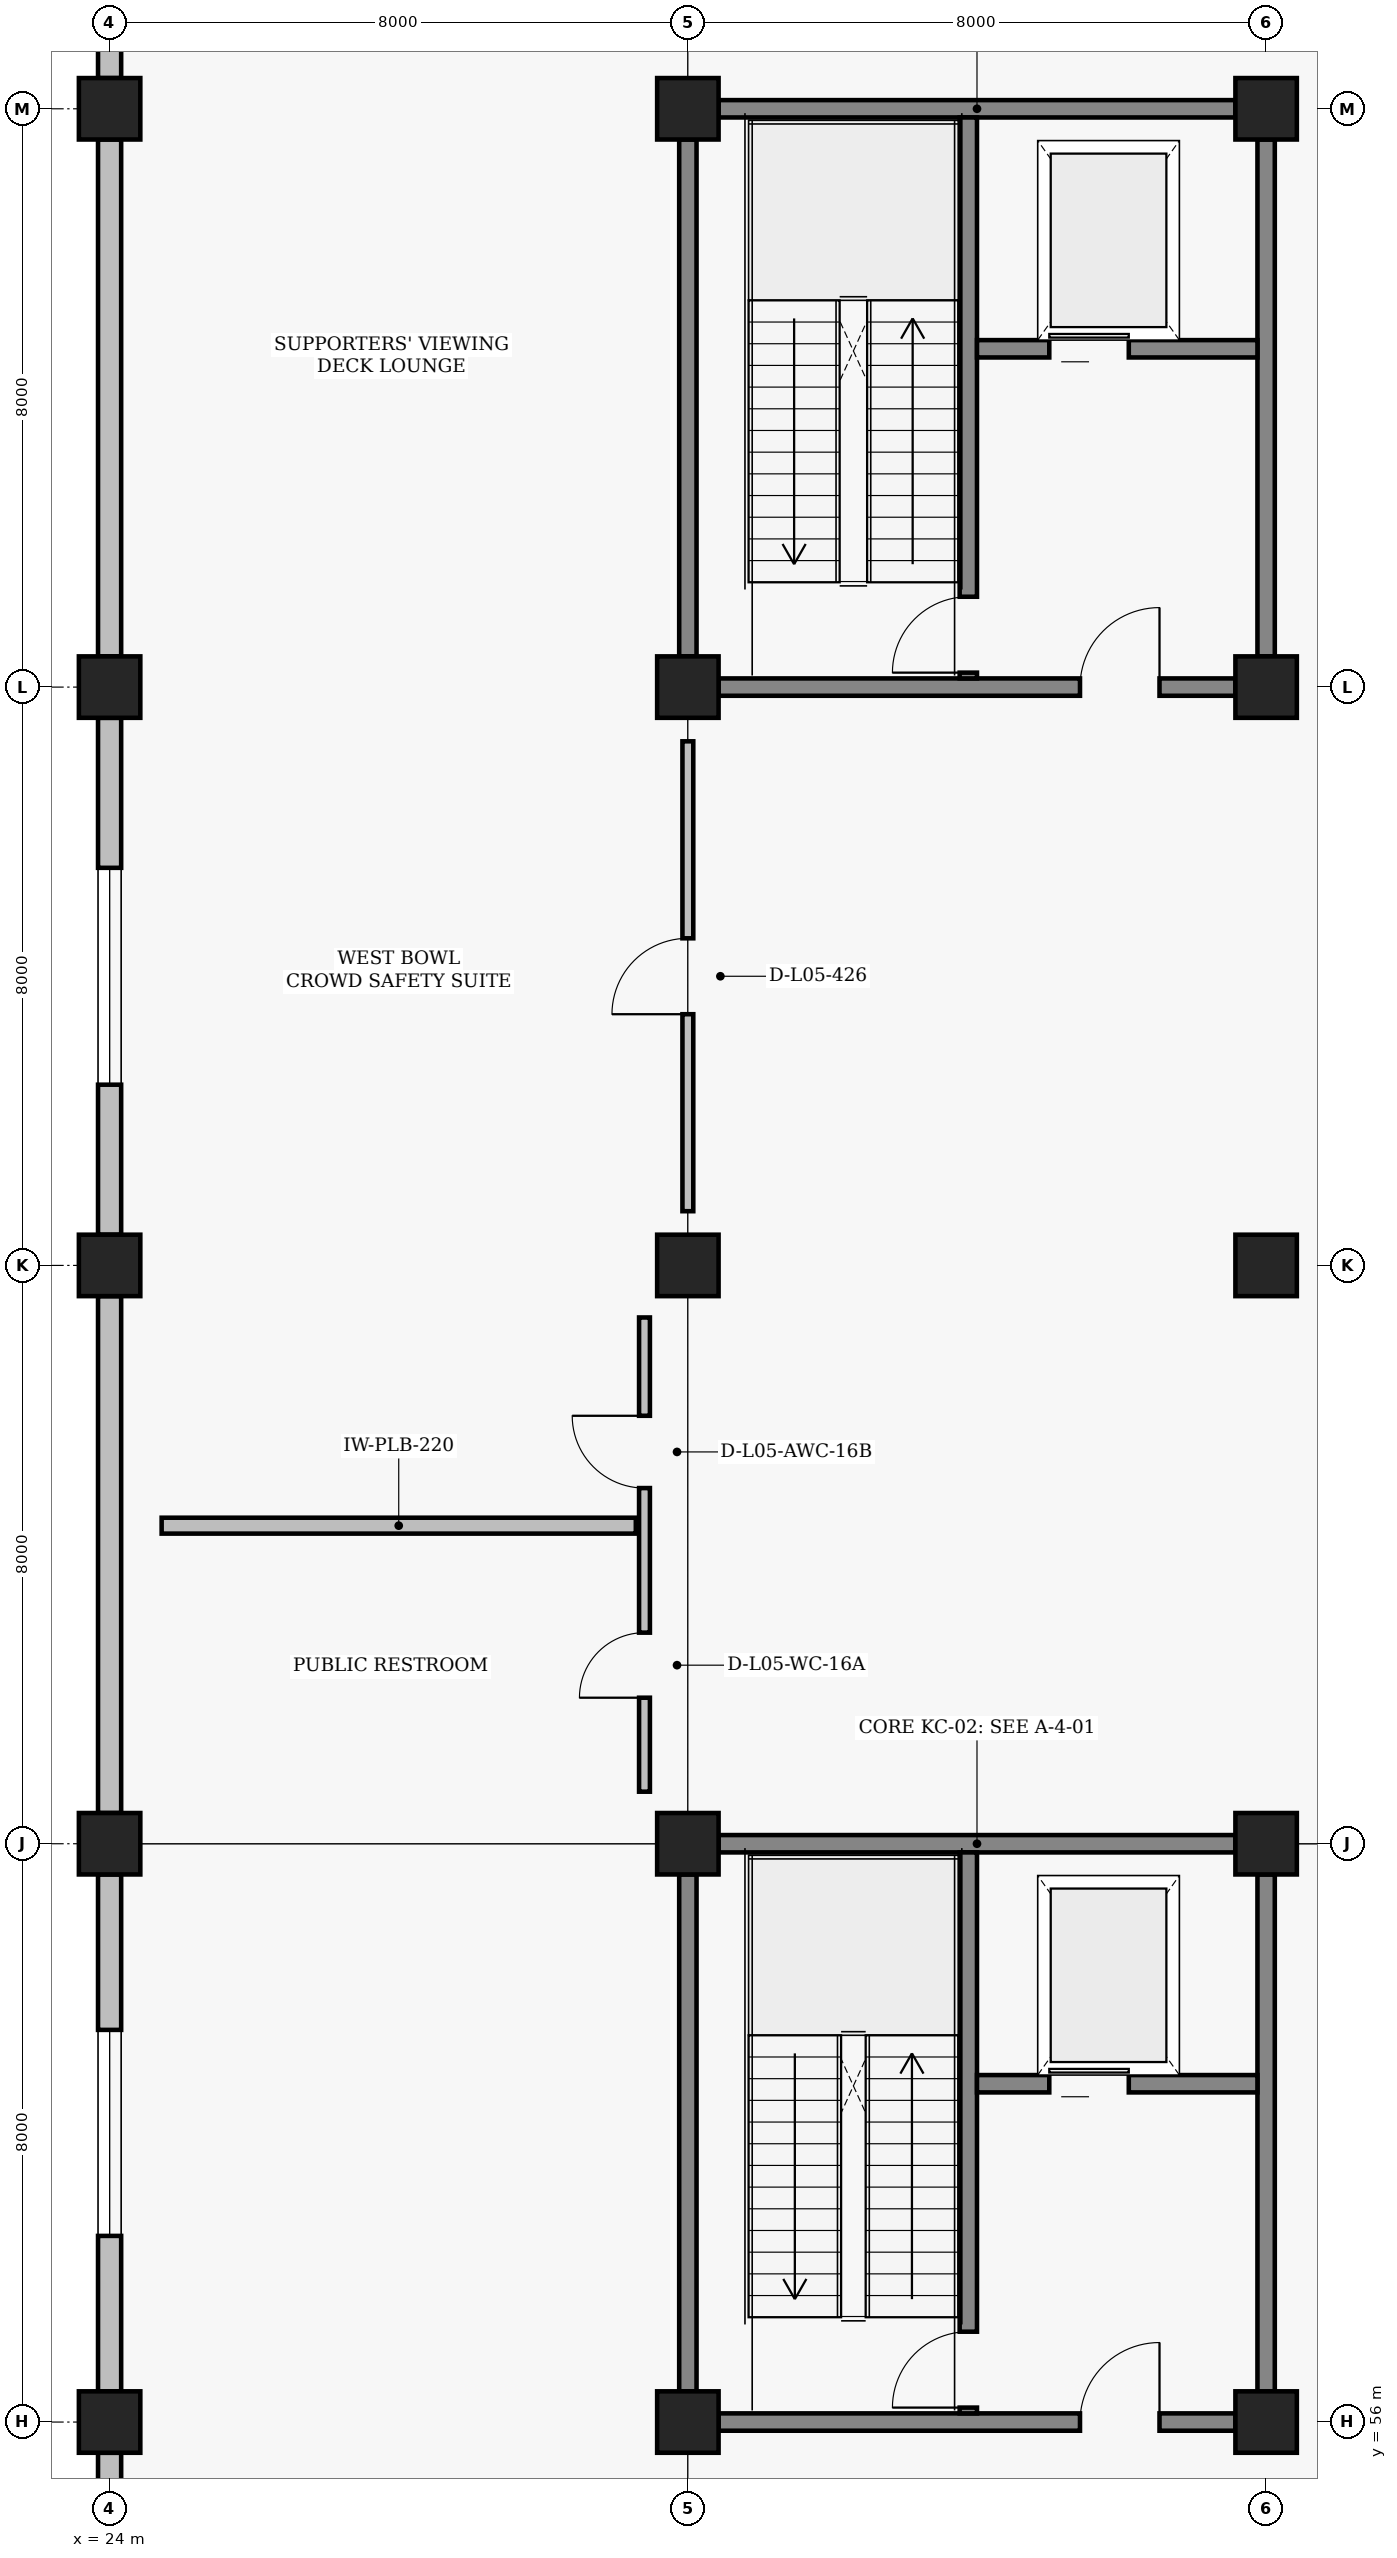
"""IFC4 building model, lengths in metres.
Left out: names, types, materials, properties, quantities, classifications, styles, units other than length and angle.
Written with IfcOpenShell. Run it as: python <this file> out.ifc"""

import sys

from ifc_helpers import new_model, si_unit, direction, frame, frame_2d, origin, origin_2d, place, context, subcontext, project, spatial, rectangle, extrude, element, fill, save


model = new_model("IFC4")
c1 = context("Model", 3, precision=1e-05, world=origin(), true_north=direction((0.0, 1.0)))
c2 = subcontext(c1, "Body", "Model", "MODEL_VIEW")
j1 = project(units=[si_unit("LENGTHUNIT", "METRE"), si_unit("PLANEANGLEUNIT", "RADIAN")], contexts=[c1])
p1 = place(None, origin())
s1 = spatial("IfcSite", under=j1, at=p1, CompositionType="ELEMENT")
p2 = place(p1, origin())
s2 = spatial("IfcBuilding", under=s1, at=p2, CompositionType="ELEMENT")
p3 = place(p2, frame((0.0, 0.0, 18.6)))
s3 = spatial("IfcBuildingStorey", under=s2, at=p3, CompositionType="ELEMENT", Elevation=18.6)
for number, where, z_axis, x_axis in (
    (1, (24.0, 56.0, 0.0), (0.0, 0.0, 1.0), (1.0, 0.0, 0.0)),
    (2, (24.0, 64.0, 0.0), (0.0, 0.0, 1.0), (1.0, 0.0, 0.0)),
    (3, (24.0, 72.0, 0.0), (0.0, 0.0, 1.0), (1.0, 0.0, 0.0)),
    (4, (24.0, 80.0, 0.0), (0.0, 0.0, 1.0), (1.0, 0.0, 0.0)),
    (5, (24.0, 88.0, 0.0), (0.0, 0.0, 1.0), (1.0, 0.0, 0.0)),
    (6, (32.0, 56.0, 0.0), (0.0, 0.0, 1.0), (1.0, 0.0, 0.0)),
    (7, (32.0, 64.0, 0.0), (0.0, 0.0, 1.0), (1.0, 0.0, 0.0)),
    (8, (32.0, 72.0, 0.0), (0.0, 0.0, 1.0), (1.0, 0.0, 0.0)),
    (9, (32.0, 80.0, 0.0), (0.0, 0.0, 1.0), (1.0, 0.0, 0.0)),
    (10, (32.0, 88.0, 0.0), (0.0, 0.0, 1.0), (1.0, 0.0, 0.0)),
    (11, (40.0, 56.0, 0.0), (0.0, 0.0, 1.0), (1.0, 0.0, 0.0)),
    (12, (40.0, 64.0, 0.0), (0.0, 0.0, 1.0), (1.0, 0.0, 0.0)),
    (13, (40.0, 72.0, 0.0), (0.0, 0.0, 1.0), (1.0, 0.0, 0.0)),
    (14, (40.0, 80.0, 0.0), (0.0, 0.0, 1.0), (1.0, 0.0, 0.0)),
    (15, (40.0, 88.0, 0.0), (0.0, 0.0, 1.0), (1.0, 0.0, 0.0)),
):
    element("IfcColumn", number, at=place(p3, frame(where, z_axis=z_axis, x_axis=x_axis)), inside=s3, PredefinedType="COLUMN", context=c2, shape_type="SweptSolid", body=[
        extrude(rectangle(XDim=0.85, YDim=0.85, at=origin_2d()), origin(), (0.0, 0.0, 1.0), 4.2),
    ])
p4 = place(p3, frame((24.0, 48.425, 0.0), z_axis=(0.0, 0.0, 1.0), x_axis=(0.0, 1.0, 0.0)))
e16 = element("IfcWall", 16, at=p4, inside=s3, PredefinedType="SOLIDWALL", context=c2, shape_type="SweptSolid", body=[
    extrude(rectangle(XDim=7.15, YDim=0.32, at=frame_2d((3.575, 0.0))), origin(), (0.0, 0.0, 1.0), 3.34),
])
p5 = place(p3, frame((24.0, 56.425, 0.0), z_axis=(0.0, 0.0, 1.0), x_axis=(0.0, 1.0, 0.0)))
e17 = element("IfcWall", 17, at=p5, inside=s3, PredefinedType="SOLIDWALL", context=c2, shape_type="SweptSolid", body=[
    extrude(rectangle(XDim=7.15, YDim=0.32, at=frame_2d((3.575, 0.0))), origin(), (0.0, 0.0, 1.0), 3.34),
])
p6 = place(p5, frame((2.15, 0.0, 0.95)))
e18 = element("IfcOpeningElement", 18, at=p6, cuts=e17, PredefinedType="OPENING", context=c2, shape_type="SweptSolid", body=[
    extrude(rectangle(XDim=2.85, YDim=2.1, at=frame_2d((1.425, 1.05))), frame((0.0, 0.17, 0.0), z_axis=(0.0, -1.0, 0.0), x_axis=(1.0, 0.0, 0.0)), (0.0, 0.0, 1.0), 0.34),
])
p7 = place(p3, frame((24.0, 64.425, 0.0), z_axis=(0.0, 0.0, 1.0), x_axis=(0.0, 1.0, 0.0)))
e19 = element("IfcWall", 19, at=p7, inside=s3, PredefinedType="SOLIDWALL", context=c2, shape_type="SweptSolid", body=[
    extrude(rectangle(XDim=7.15, YDim=0.32, at=frame_2d((3.575, 0.0))), origin(), (0.0, 0.0, 1.0), 3.34),
])
p8 = place(p3, frame((24.0, 72.425, 0.0), z_axis=(0.0, 0.0, 1.0), x_axis=(0.0, 1.0, 0.0)))
e20 = element("IfcWall", 20, at=p8, inside=s3, PredefinedType="SOLIDWALL", context=c2, shape_type="SweptSolid", body=[
    extrude(rectangle(XDim=7.15, YDim=0.32, at=frame_2d((3.575, 0.0))), origin(), (0.0, 0.0, 1.0), 3.34),
])
p9 = place(p8, frame((2.075, 0.0, 0.95)))
e21 = element("IfcOpeningElement", 21, at=p9, cuts=e20, PredefinedType="OPENING", context=c2, shape_type="SweptSolid", body=[
    extrude(rectangle(XDim=3.0, YDim=2.1, at=frame_2d((1.5, 1.05))), frame((0.0, 0.17, 0.0), z_axis=(0.0, -1.0, 0.0), x_axis=(1.0, 0.0, 0.0)), (0.0, 0.0, 1.0), 0.34),
])
for number, where, z_axis, x_axis in (
    (22, (24.0, 80.425, 0.0), (0.0, 0.0, 1.0), (0.0, 1.0, 0.0)),
    (23, (24.0, 88.425, 0.0), (0.0, 0.0, 1.0), (0.0, 1.0, 0.0)),
):
    element("IfcWall", number, at=place(p3, frame(where, z_axis=z_axis, x_axis=x_axis)), inside=s3, PredefinedType="SOLIDWALL", context=c2, shape_type="SweptSolid", body=[
        extrude(rectangle(XDim=7.15, YDim=0.32, at=frame_2d((3.575, 0.0))), origin(), (0.0, 0.0, 1.0), 3.34),
    ])
p10 = place(p3, frame((32.425, 56.0, 0.0), z_axis=(0.0, 0.0, 1.0), x_axis=(1.0, 0.0, 0.0)))
e24 = element("IfcWall", 24, at=p10, inside=s3, PredefinedType="SHEAR", context=c2, shape_type="SweptSolid", body=[
    extrude(rectangle(XDim=7.15, YDim=0.24, at=frame_2d((3.575, 0.0))), origin(), (0.0, 0.0, 1.0), 3.34),
])
p11 = place(p10, frame((5.0, 0.0, 0.0)))
e25 = element("IfcOpeningElement", 25, at=p11, cuts=e24, PredefinedType="OPENING", context=c2, shape_type="SweptSolid", body=[
    extrude(rectangle(XDim=1.1, YDim=2.2, at=frame_2d((0.55, 1.1))), frame((0.0, 0.13, 0.0), z_axis=(0.0, -1.0, 0.0), x_axis=(1.0, 0.0, 0.0)), (0.0, 0.0, 1.0), 0.26),
])
for number, where, z_axis, x_axis in (
    (26, (32.425, 64.0, 0.0), (0.0, 0.0, 1.0), (1.0, 0.0, 0.0)),
    (27, (32.0, 56.425, 0.0), (0.0, 0.0, 1.0), (0.0, 1.0, 0.0)),
    (28, (40.0, 56.425, 0.0), (0.0, 0.0, 1.0), (0.0, 1.0, 0.0)),
):
    element("IfcWall", number, at=place(p3, frame(where, z_axis=z_axis, x_axis=x_axis)), inside=s3, PredefinedType="SHEAR", context=c2, shape_type="SweptSolid", body=[
        extrude(rectangle(XDim=7.15, YDim=0.24, at=frame_2d((3.575, 0.0))), origin(), (0.0, 0.0, 1.0), 3.34),
    ])
p12 = place(p3, frame((35.88, 56.12, 0.0), z_axis=(0.0, 0.0, 1.0), x_axis=(0.0, 1.0, 0.0)))
e29 = element("IfcWall", 29, at=p12, inside=s3, PredefinedType="SHEAR", context=c2, shape_type="SweptSolid", body=[
    extrude(rectangle(XDim=7.76, YDim=0.24, at=frame_2d((3.88, 0.0))), origin(), (0.0, 0.0, 1.0), 3.44),
])
p13 = place(p12, frame((0.08, 0.0, 0.0)))
e30 = element("IfcOpeningElement", 30, at=p13, cuts=e29, PredefinedType="OPENING", context=c2, shape_type="SweptSolid", body=[
    extrude(rectangle(XDim=1.05, YDim=2.15, at=frame_2d((0.525, 1.075))), frame((0.0, 0.13, 0.0), z_axis=(0.0, -1.0, 0.0), x_axis=(1.0, 0.0, 0.0)), (0.0, 0.0, 1.0), 0.26),
])
p14 = place(p3, frame((36.0, 60.68, 0.0), z_axis=(0.0, 0.0, 1.0), x_axis=(1.0, 0.0, 0.0)))
e31 = element("IfcWall", 31, at=p14, inside=s3, PredefinedType="SHEAR", context=c2, shape_type="SweptSolid", body=[
    extrude(rectangle(XDim=3.88, YDim=0.24, at=frame_2d((1.94, 0.0))), origin(), (0.0, 0.0, 1.0), 3.34),
])
p15 = place(p14, frame((1.0, 0.0, 0.0)))
e32 = element("IfcOpeningElement", 32, at=p15, cuts=e31, PredefinedType="OPENING", context=c2, shape_type="SweptSolid", body=[
    extrude(rectangle(XDim=1.1, YDim=2.15, at=frame_2d((0.55, 1.075))), frame((0.0, 0.13, 0.0), z_axis=(0.0, -1.0, 0.0), x_axis=(1.0, 0.0, 0.0)), (0.0, 0.0, 1.0), 0.26),
])
p16 = place(p3, frame((32.425, 80.0, 0.0), z_axis=(0.0, 0.0, 1.0), x_axis=(1.0, 0.0, 0.0)))
e33 = element("IfcWall", 33, at=p16, inside=s3, PredefinedType="SHEAR", context=c2, shape_type="SweptSolid", body=[
    extrude(rectangle(XDim=7.15, YDim=0.24, at=frame_2d((3.575, 0.0))), origin(), (0.0, 0.0, 1.0), 3.34),
])
p17 = place(p16, frame((5.0, 0.0, 0.0)))
e34 = element("IfcOpeningElement", 34, at=p17, cuts=e33, PredefinedType="OPENING", context=c2, shape_type="SweptSolid", body=[
    extrude(rectangle(XDim=1.1, YDim=2.2, at=frame_2d((0.55, 1.1))), frame((0.0, 0.13, 0.0), z_axis=(0.0, -1.0, 0.0), x_axis=(1.0, 0.0, 0.0)), (0.0, 0.0, 1.0), 0.26),
])
for number, where, z_axis, x_axis in (
    (35, (32.425, 88.0, 0.0), (0.0, 0.0, 1.0), (1.0, 0.0, 0.0)),
    (36, (32.0, 80.425, 0.0), (0.0, 0.0, 1.0), (0.0, 1.0, 0.0)),
    (37, (40.0, 80.425, 0.0), (0.0, 0.0, 1.0), (0.0, 1.0, 0.0)),
):
    element("IfcWall", number, at=place(p3, frame(where, z_axis=z_axis, x_axis=x_axis)), inside=s3, PredefinedType="SHEAR", context=c2, shape_type="SweptSolid", body=[
        extrude(rectangle(XDim=7.15, YDim=0.24, at=frame_2d((3.575, 0.0))), origin(), (0.0, 0.0, 1.0), 3.34),
    ])
p18 = place(p3, frame((35.88, 80.12, 0.0), z_axis=(0.0, 0.0, 1.0), x_axis=(0.0, 1.0, 0.0)))
e38 = element("IfcWall", 38, at=p18, inside=s3, PredefinedType="SHEAR", context=c2, shape_type="SweptSolid", body=[
    extrude(rectangle(XDim=7.76, YDim=0.24, at=frame_2d((3.88, 0.0))), origin(), (0.0, 0.0, 1.0), 3.44),
])
p19 = place(p18, frame((0.08, 0.0, 0.0)))
e39 = element("IfcOpeningElement", 39, at=p19, cuts=e38, PredefinedType="OPENING", context=c2, shape_type="SweptSolid", body=[
    extrude(rectangle(XDim=1.05, YDim=2.15, at=frame_2d((0.525, 1.075))), frame((0.0, 0.13, 0.0), z_axis=(0.0, -1.0, 0.0), x_axis=(1.0, 0.0, 0.0)), (0.0, 0.0, 1.0), 0.26),
])
p20 = place(p3, frame((36.0, 84.68, 0.0), z_axis=(0.0, 0.0, 1.0), x_axis=(1.0, 0.0, 0.0)))
e40 = element("IfcWall", 40, at=p20, inside=s3, PredefinedType="SHEAR", context=c2, shape_type="SweptSolid", body=[
    extrude(rectangle(XDim=3.88, YDim=0.24, at=frame_2d((1.94, 0.0))), origin(), (0.0, 0.0, 1.0), 3.34),
])
p21 = place(p20, frame((1.0, 0.0, 0.0)))
e41 = element("IfcOpeningElement", 41, at=p21, cuts=e40, PredefinedType="OPENING", context=c2, shape_type="SweptSolid", body=[
    extrude(rectangle(XDim=1.1, YDim=2.15, at=frame_2d((0.55, 1.075))), frame((0.0, 0.13, 0.0), z_axis=(0.0, -1.0, 0.0), x_axis=(1.0, 0.0, 0.0)), (0.0, 0.0, 1.0), 0.26),
])
p22 = place(p3, frame((24.72, 68.4, 0.0), z_axis=(0.0, 0.0, 1.0), x_axis=(1.0, 0.0, 0.0)))
e42 = element("IfcWall", 42, at=p22, inside=s3, PredefinedType="PLUMBINGWALL", context=c2, shape_type="SweptSolid", body=[
    extrude(rectangle(XDim=6.56, YDim=0.22, at=frame_2d((3.28, 0.0))), origin(), (0.0, 0.0, 1.0), 3.64),
])
p23 = place(p3, frame((31.4, 64.72, 0.0), z_axis=(0.0, 0.0, 1.0), x_axis=(0.0, 1.0, 0.0)))
e43 = element("IfcWall", 43, at=p23, inside=s3, PredefinedType="PARTITIONING", context=c2, shape_type="SweptSolid", body=[
    extrude(rectangle(XDim=6.56, YDim=0.15, at=frame_2d((3.28, 0.0))), origin(), (0.0, 0.0, 1.0), 3.64),
])
p24 = place(p23, frame((1.3, 0.0, 0.0)))
e44 = element("IfcOpeningElement", 44, at=p24, cuts=e43, PredefinedType="OPENING", context=c2, shape_type="SweptSolid", body=[
    extrude(rectangle(XDim=0.9, YDim=2.1, at=frame_2d((0.45, 1.05))), frame((0.0, 0.085, 0.0), z_axis=(0.0, -1.0, 0.0), x_axis=(1.0, 0.0, 0.0)), (0.0, 0.0, 1.0), 0.17),
])
p25 = place(p23, frame((4.2, 0.0, 0.0)))
e45 = element("IfcOpeningElement", 45, at=p25, cuts=e43, PredefinedType="OPENING", context=c2, shape_type="SweptSolid", body=[
    extrude(rectangle(XDim=1.0, YDim=2.15, at=frame_2d((0.5, 1.075))), frame((0.0, 0.085, 0.0), z_axis=(0.0, -1.0, 0.0), x_axis=(1.0, 0.0, 0.0)), (0.0, 0.0, 1.0), 0.17),
])
p26 = place(p3, frame((32.0, 72.75, 0.0), z_axis=(0.0, 0.0, 1.0), x_axis=(0.0, 1.0, 0.0)))
e46 = element("IfcWall", 46, at=p26, inside=s3, PredefinedType="PARTITIONING", context=c2, shape_type="SweptSolid", body=[
    extrude(rectangle(XDim=6.5, YDim=0.15, at=frame_2d((3.25, 0.0))), origin(), (0.0, 0.0, 1.0), 3.34),
])
p27 = place(p26, frame((2.725, 0.0, 0.0)))
e47 = element("IfcOpeningElement", 47, at=p27, cuts=e46, PredefinedType="OPENING", context=c2, shape_type="SweptSolid", body=[
    extrude(rectangle(XDim=1.05, YDim=2.15, at=frame_2d((0.525, 1.075))), frame((0.0, 0.085, 0.0), z_axis=(0.0, -1.0, 0.0), x_axis=(1.0, 0.0, 0.0)), (0.0, 0.0, 1.0), 0.17),
])
p28 = place(p6, origin())
e48 = element("IfcWindow", 48, at=p28, inside=s3, PartitioningType="SINGLE_PANEL", PredefinedType="WINDOW", context=c2, shape_type="SweptSolid", body=[
    extrude(rectangle(XDim=2.85, YDim=2.1, at=frame_2d((1.425, 1.05))), frame((0.0, 0.03, 0.0), z_axis=(0.0, -1.0, 0.0), x_axis=(1.0, 0.0, 0.0)), (0.0, 0.0, 1.0), 0.06),
])
fill(e18, e48)
p29 = place(p9, origin())
e49 = element("IfcWindow", 49, at=p29, inside=s3, PartitioningType="SINGLE_PANEL", PredefinedType="WINDOW", context=c2, shape_type="SweptSolid", body=[
    extrude(rectangle(XDim=3.0, YDim=2.1, at=frame_2d((1.5, 1.05))), frame((0.0, 0.03, 0.0), z_axis=(0.0, -1.0, 0.0), x_axis=(1.0, 0.0, 0.0)), (0.0, 0.0, 1.0), 0.06),
])
fill(e21, e49)
p30 = place(p11, origin())
e50 = element("IfcDoor", 50, at=p30, inside=s3, OperationType="SINGLE_SWING_RIGHT", PredefinedType="DOOR", context=c2, shape_type="SweptSolid", body=[
    extrude(rectangle(XDim=1.1, YDim=2.2, at=frame_2d((0.55, 1.1))), frame((0.0, 0.025, 0.0), z_axis=(0.0, -1.0, 0.0), x_axis=(1.0, 0.0, 0.0)), (0.0, 0.0, 1.0), 0.05),
])
fill(e25, e50)
p31 = place(p13, origin())
e51 = element("IfcDoor", 51, at=p31, inside=s3, OperationType="SINGLE_SWING_LEFT", PredefinedType="DOOR", context=c2, shape_type="SweptSolid", body=[
    extrude(rectangle(XDim=1.05, YDim=2.15, at=frame_2d((0.525, 1.075))), frame((0.0, 0.025, 0.0), z_axis=(0.0, -1.0, 0.0), x_axis=(1.0, 0.0, 0.0)), (0.0, 0.0, 1.0), 0.05),
])
fill(e30, e51)
p32 = place(p15, origin())
e52 = element("IfcDoor", 52, at=p32, inside=s3, OperationType="SLIDING_TO_LEFT", PredefinedType="DOOR", context=c2, shape_type="SweptSolid", body=[
    extrude(rectangle(XDim=1.1, YDim=2.15, at=frame_2d((0.55, 1.075))), frame((0.0, 0.025, 0.0), z_axis=(0.0, -1.0, 0.0), x_axis=(1.0, 0.0, 0.0)), (0.0, 0.0, 1.0), 0.05),
])
fill(e32, e52)
p33 = place(p17, origin())
e53 = element("IfcDoor", 53, at=p33, inside=s3, OperationType="SINGLE_SWING_RIGHT", PredefinedType="DOOR", context=c2, shape_type="SweptSolid", body=[
    extrude(rectangle(XDim=1.1, YDim=2.2, at=frame_2d((0.55, 1.1))), frame((0.0, 0.025, 0.0), z_axis=(0.0, -1.0, 0.0), x_axis=(1.0, 0.0, 0.0)), (0.0, 0.0, 1.0), 0.05),
])
fill(e34, e53)
p34 = place(p19, origin())
e54 = element("IfcDoor", 54, at=p34, inside=s3, OperationType="SINGLE_SWING_LEFT", PredefinedType="DOOR", context=c2, shape_type="SweptSolid", body=[
    extrude(rectangle(XDim=1.05, YDim=2.15, at=frame_2d((0.525, 1.075))), frame((0.0, 0.025, 0.0), z_axis=(0.0, -1.0, 0.0), x_axis=(1.0, 0.0, 0.0)), (0.0, 0.0, 1.0), 0.05),
])
fill(e39, e54)
p35 = place(p21, origin())
e55 = element("IfcDoor", 55, at=p35, inside=s3, OperationType="SLIDING_TO_LEFT", PredefinedType="DOOR", context=c2, shape_type="SweptSolid", body=[
    extrude(rectangle(XDim=1.1, YDim=2.15, at=frame_2d((0.55, 1.075))), frame((0.0, 0.025, 0.0), z_axis=(0.0, -1.0, 0.0), x_axis=(1.0, 0.0, 0.0)), (0.0, 0.0, 1.0), 0.05),
])
fill(e41, e55)
p36 = place(p24, origin())
e56 = element("IfcDoor", 56, at=p36, inside=s3, OperationType="SINGLE_SWING_LEFT", PredefinedType="DOOR", context=c2, shape_type="SweptSolid", body=[
    extrude(rectangle(XDim=0.9, YDim=2.1, at=frame_2d((0.45, 1.05))), frame((0.0, 0.025, 0.0), z_axis=(0.0, -1.0, 0.0), x_axis=(1.0, 0.0, 0.0)), (0.0, 0.0, 1.0), 0.05),
])
fill(e44, e56)
p37 = place(p25, origin())
e57 = element("IfcDoor", 57, at=p37, inside=s3, OperationType="SINGLE_SWING_RIGHT", PredefinedType="DOOR", context=c2, shape_type="SweptSolid", body=[
    extrude(rectangle(XDim=1.0, YDim=2.15, at=frame_2d((0.5, 1.075))), frame((0.0, 0.025, 0.0), z_axis=(0.0, -1.0, 0.0), x_axis=(1.0, 0.0, 0.0)), (0.0, 0.0, 1.0), 0.05),
])
fill(e45, e57)
p38 = place(p27, origin())
e58 = element("IfcDoor", 58, at=p38, inside=s3, OperationType="SINGLE_SWING_LEFT", PredefinedType="DOOR", context=c2, shape_type="SweptSolid", body=[
    extrude(rectangle(XDim=1.05, YDim=2.15, at=frame_2d((0.525, 1.075))), frame((0.0, 0.025, 0.0), z_axis=(0.0, -1.0, 0.0), x_axis=(1.0, 0.0, 0.0)), (0.0, 0.0, 1.0), 0.05),
])
fill(e47, e58)
save(model, sys.argv[1])
